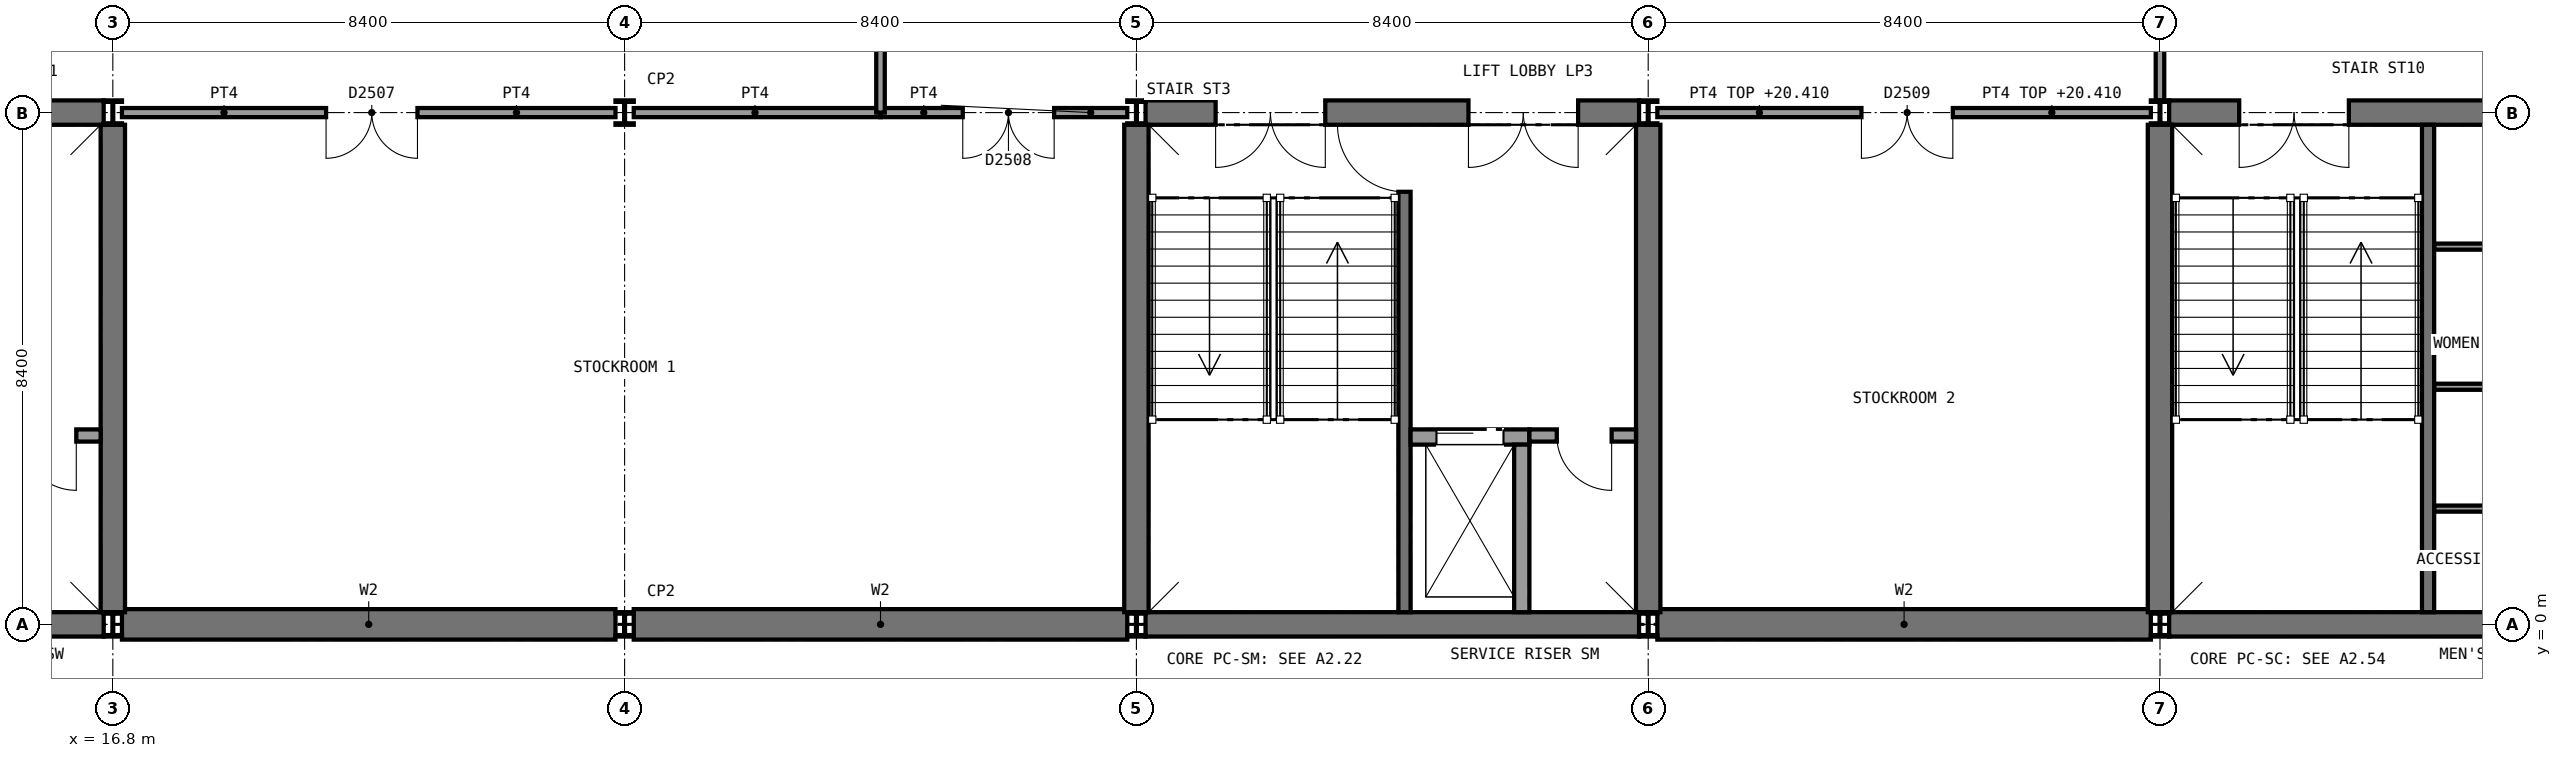
"""IFC4 building model, lengths in metres.
Left out: names, types, materials, properties, quantities, classifications, styles, units other than length and angle.
Written with IfcOpenShell. Run it as: python <this file> out.ifc"""

import sys

from ifc_helpers import new_model, si_unit, direction, frame, frame_2d, origin, origin_2d, place, context, subcontext, project, spatial, rectangle, i_section, extrude, element, fill, save


model = new_model("IFC4")
c1 = context("Model", 3, precision=1e-05, world=origin(), true_north=direction((0.0, 1.0)))
c2 = subcontext(c1, "Body", "Model", "MODEL_VIEW")
j1 = project(units=[si_unit("LENGTHUNIT", "METRE"), si_unit("PLANEANGLEUNIT", "RADIAN")], contexts=[c1])
p1 = place(None, origin())
s1 = spatial("IfcSite", under=j1, at=p1, CompositionType="ELEMENT")
p2 = place(p1, origin())
s2 = spatial("IfcBuilding", under=s1, at=p2, CompositionType="ELEMENT")
p3 = place(p2, frame((0.0, 0.0, 16.2)))
s3 = spatial("IfcBuildingStorey", under=s2, at=p3, CompositionType="ELEMENT", Elevation=16.2)
p4 = place(p3, frame((16.95, 0.0, 0.0), z_axis=(0.0, 0.0, 1.0), x_axis=(1.0, 0.0, 0.0)))
e1 = element("IfcWall", 1, at=p4, inside=s3, PredefinedType="SHEAR", context=c2, shape_type="SweptSolid", body=[
    extrude(rectangle(XDim=8.1, YDim=0.5, at=frame_2d((4.05, 0.0))), origin(), (0.0, 0.0, 1.0), 4.65),
])
p5 = place(p3, frame((25.35, 0.0, 0.0), z_axis=(0.0, 0.0, 1.0), x_axis=(1.0, 0.0, 0.0)))
e2 = element("IfcWall", 2, at=p5, inside=s3, PredefinedType="SHEAR", context=c2, shape_type="SweptSolid", body=[
    extrude(rectangle(XDim=8.1, YDim=0.5, at=frame_2d((4.05, 0.0))), origin(), (0.0, 0.0, 1.0), 4.65),
])
p6 = place(p3, frame((42.15, 0.0, 0.0), z_axis=(0.0, 0.0, 1.0), x_axis=(1.0, 0.0, 0.0)))
e3 = element("IfcWall", 3, at=p6, inside=s3, PredefinedType="SHEAR", context=c2, shape_type="SweptSolid", body=[
    extrude(rectangle(XDim=8.1, YDim=0.5, at=frame_2d((4.05, 0.0))), origin(), (0.0, 0.0, 1.0), 4.65),
])
p7 = place(p3, frame((8.55, 0.0, 0.0), z_axis=(0.0, 0.0, 1.0), x_axis=(1.0, 0.0, 0.0)))
e4 = element("IfcWall", 4, at=p7, inside=s3, PredefinedType="SHEAR", context=c2, shape_type="SweptSolid", body=[
    extrude(rectangle(XDim=8.1, YDim=0.4, at=frame_2d((4.05, 0.0))), origin(), (0.0, 0.0, 1.0), 4.65),
])
p8 = place(p3, frame((8.55, 8.4, 0.0), z_axis=(0.0, 0.0, 1.0), x_axis=(1.0, 0.0, 0.0)))
e5 = element("IfcWall", 5, at=p8, inside=s3, PredefinedType="SHEAR", context=c2, shape_type="SweptSolid", body=[
    extrude(rectangle(XDim=8.1, YDim=0.4, at=frame_2d((4.05, 0.0))), origin(), (0.0, 0.0, 1.0), 4.65),
])
p9 = place(p8, frame((1.15, 0.0, 0.0)))
e6 = element("IfcOpeningElement", 6, at=p9, cuts=e5, PredefinedType="OPENING", context=c2, shape_type="SweptSolid", body=[
    extrude(rectangle(XDim=1.8, YDim=2.1, at=frame_2d((0.9, 1.05))), frame((0.0, 0.21, 0.0), z_axis=(0.0, -1.0, 0.0), x_axis=(1.0, 0.0, 0.0)), (0.0, 0.0, 1.0), 0.42),
])
p10 = place(p8, frame((5.3, 0.0, 0.0)))
e7 = element("IfcOpeningElement", 7, at=p10, cuts=e5, PredefinedType="OPENING", context=c2, shape_type="SweptSolid", body=[
    extrude(rectangle(XDim=1.8, YDim=2.1, at=frame_2d((0.9, 1.05))), frame((0.0, 0.21, 0.0), z_axis=(0.0, -1.0, 0.0), x_axis=(1.0, 0.0, 0.0)), (0.0, 0.0, 1.0), 0.42),
])
p11 = place(p3, frame((16.8, 0.2, 0.0), z_axis=(0.0, 0.0, 1.0), x_axis=(0.0, 1.0, 0.0)))
e8 = element("IfcWall", 8, at=p11, inside=s3, PredefinedType="SHEAR", context=c2, shape_type="SweptSolid", body=[
    extrude(rectangle(XDim=8.0, YDim=0.4, at=frame_2d((4.0, 0.0))), origin(), (0.0, 0.0, 1.0), 4.65),
])
p12 = place(p3, frame((33.75, 0.0, 0.0), z_axis=(0.0, 0.0, 1.0), x_axis=(1.0, 0.0, 0.0)))
e9 = element("IfcWall", 9, at=p12, inside=s3, PredefinedType="SHEAR", context=c2, shape_type="SweptSolid", body=[
    extrude(rectangle(XDim=8.1, YDim=0.4, at=frame_2d((4.05, 0.0))), origin(), (0.0, 0.0, 1.0), 4.65),
])
p13 = place(p3, frame((33.75, 8.4, 0.0), z_axis=(0.0, 0.0, 1.0), x_axis=(1.0, 0.0, 0.0)))
e10 = element("IfcWall", 10, at=p13, inside=s3, PredefinedType="SHEAR", context=c2, shape_type="SweptSolid", body=[
    extrude(rectangle(XDim=8.1, YDim=0.4, at=frame_2d((4.05, 0.0))), origin(), (0.0, 0.0, 1.0), 4.65),
])
p14 = place(p13, frame((1.15, 0.0, 0.0)))
e11 = element("IfcOpeningElement", 11, at=p14, cuts=e10, PredefinedType="OPENING", context=c2, shape_type="SweptSolid", body=[
    extrude(rectangle(XDim=1.8, YDim=2.1, at=frame_2d((0.9, 1.05))), frame((0.0, 0.21, 0.0), z_axis=(0.0, -1.0, 0.0), x_axis=(1.0, 0.0, 0.0)), (0.0, 0.0, 1.0), 0.42),
])
p15 = place(p13, frame((5.3, 0.0, 0.0)))
e12 = element("IfcOpeningElement", 12, at=p15, cuts=e10, PredefinedType="OPENING", context=c2, shape_type="SweptSolid", body=[
    extrude(rectangle(XDim=1.8, YDim=2.1, at=frame_2d((0.9, 1.05))), frame((0.0, 0.21, 0.0), z_axis=(0.0, -1.0, 0.0), x_axis=(1.0, 0.0, 0.0)), (0.0, 0.0, 1.0), 0.42),
])
for number, where, z_axis, x_axis in (
    (13, (33.6, 0.2, 0.0), (0.0, 0.0, 1.0), (0.0, 1.0, 0.0)),
    (14, (42.0, 0.2, 0.0), (0.0, 0.0, 1.0), (0.0, 1.0, 0.0)),
):
    element("IfcWall", number, at=place(p3, frame(where, z_axis=z_axis, x_axis=x_axis)), inside=s3, PredefinedType="SHEAR", context=c2, shape_type="SweptSolid", body=[
        extrude(rectangle(XDim=8.0, YDim=0.4, at=frame_2d((4.0, 0.0))), origin(), (0.0, 0.0, 1.0), 4.65),
    ])
p16 = place(p3, frame((50.55, 0.0, 0.0), z_axis=(0.0, 0.0, 1.0), x_axis=(1.0, 0.0, 0.0)))
e15 = element("IfcWall", 15, at=p16, inside=s3, PredefinedType="SHEAR", context=c2, shape_type="SweptSolid", body=[
    extrude(rectangle(XDim=8.1, YDim=0.4, at=frame_2d((4.05, 0.0))), origin(), (0.0, 0.0, 1.0), 4.65),
])
p17 = place(p3, frame((50.55, 8.4, 0.0), z_axis=(0.0, 0.0, 1.0), x_axis=(1.0, 0.0, 0.0)))
e16 = element("IfcWall", 16, at=p17, inside=s3, PredefinedType="SHEAR", context=c2, shape_type="SweptSolid", body=[
    extrude(rectangle(XDim=8.1, YDim=0.4, at=frame_2d((4.05, 0.0))), origin(), (0.0, 0.0, 1.0), 4.65),
])
p18 = place(p17, frame((1.15, 0.0, 0.0)))
e17 = element("IfcOpeningElement", 17, at=p18, cuts=e16, PredefinedType="OPENING", context=c2, shape_type="SweptSolid", body=[
    extrude(rectangle(XDim=1.8, YDim=2.1, at=frame_2d((0.9, 1.05))), frame((0.0, 0.21, 0.0), z_axis=(0.0, -1.0, 0.0), x_axis=(1.0, 0.0, 0.0)), (0.0, 0.0, 1.0), 0.42),
])
p19 = place(p17, frame((5.6, 0.0, 0.0)))
e18 = element("IfcOpeningElement", 18, at=p19, cuts=e16, PredefinedType="OPENING", context=c2, shape_type="SweptSolid", body=[
    extrude(rectangle(XDim=1.2, YDim=2.1, at=frame_2d((0.6, 1.05))), frame((0.0, 0.21, 0.0), z_axis=(0.0, -1.0, 0.0), x_axis=(1.0, 0.0, 0.0)), (0.0, 0.0, 1.0), 0.42),
])
p20 = place(p3, frame((50.4, 0.2, 0.0), z_axis=(0.0, 0.0, 1.0), x_axis=(0.0, 1.0, 0.0)))
e19 = element("IfcWall", 19, at=p20, inside=s3, PredefinedType="SHEAR", context=c2, shape_type="SweptSolid", body=[
    extrude(rectangle(XDim=8.0, YDim=0.4, at=frame_2d((4.0, 0.0))), origin(), (0.0, 0.0, 1.0), 4.65),
])
for number, where, z_axis, x_axis in (
    (20, (16.8, 0.0, 0.0), (0.0, 0.0, 1.0), (1.0, 0.0, 0.0)),
    (21, (16.8, 8.4, 0.0), (0.0, 0.0, 1.0), (1.0, 0.0, 0.0)),
    (22, (25.2, 0.0, 0.0), (0.0, 0.0, 1.0), (1.0, 0.0, 0.0)),
    (23, (25.2, 8.4, 0.0), (0.0, 0.0, 1.0), (1.0, 0.0, 0.0)),
    (24, (33.6, 0.0, 0.0), (0.0, 0.0, 1.0), (1.0, 0.0, 0.0)),
    (25, (33.6, 8.4, 0.0), (0.0, 0.0, 1.0), (1.0, 0.0, 0.0)),
    (26, (42.0, 0.0, 0.0), (0.0, 0.0, 1.0), (1.0, 0.0, 0.0)),
    (27, (42.0, 8.4, 0.0), (0.0, 0.0, 1.0), (1.0, 0.0, 0.0)),
    (28, (50.4, 0.0, 0.0), (0.0, 0.0, 1.0), (1.0, 0.0, 0.0)),
    (29, (50.4, 8.4, 0.0), (0.0, 0.0, 1.0), (1.0, 0.0, 0.0)),
):
    element("IfcColumn", number, at=place(p3, frame(where, z_axis=z_axis, x_axis=x_axis)), inside=s3, PredefinedType="COLUMN", context=c2, shape_type="SweptSolid", body=[
        extrude(i_section(OverallWidth=0.3, OverallDepth=0.4, WebThickness=0.013, FlangeThickness=0.024, FilletRadius=0.027, at=origin_2d()), origin(), (0.0, 0.0, 1.0), 4.8),
    ])
p21 = place(p3, frame((54.9, 6.2, 0.0), z_axis=(0.0, 0.0, 1.0), x_axis=(1.0, 0.0, 0.0)))
e30 = element("IfcWall", 30, at=p21, inside=s3, PredefinedType="PARTITIONING", context=c2, shape_type="SweptSolid", body=[
    extrude(rectangle(XDim=2.4, YDim=0.1, at=frame_2d((1.2, 0.0))), origin(), (0.0, 0.0, 1.0), 4.58),
])
p22 = place(p21, frame((0.85, 0.0, 0.0)))
e31 = element("IfcOpeningElement", 31, at=p22, cuts=e30, PredefinedType="OPENING", context=c2, shape_type="SweptSolid", body=[
    extrude(rectangle(XDim=0.9, YDim=2.1, at=frame_2d((0.45, 1.05))), frame((0.0, 0.06, 0.0), z_axis=(0.0, -1.0, 0.0), x_axis=(1.0, 0.0, 0.0)), (0.0, 0.0, 1.0), 0.12),
])
for number, where, z_axis, x_axis in (
    (32, (54.9, 3.9, 0.0), (0.0, 0.0, 1.0), (1.0, 0.0, 0.0)),
    (33, (54.9, 1.9, 0.0), (0.0, 0.0, 1.0), (1.0, 0.0, 0.0)),
):
    element("IfcWall", number, at=place(p3, frame(where, z_axis=z_axis, x_axis=x_axis)), inside=s3, PredefinedType="PARTITIONING", context=c2, shape_type="SweptSolid", body=[
        extrude(rectangle(XDim=2.4, YDim=0.1, at=frame_2d((1.2, 0.0))), origin(), (0.0, 0.0, 1.0), 4.58),
    ])
p23 = place(p3, frame((16.95, 8.4, 0.0), z_axis=(0.0, 0.0, 1.0), x_axis=(1.0, 0.0, 0.0)))
e34 = element("IfcWall", 34, at=p23, inside=s3, PredefinedType="SOLIDWALL", context=c2, shape_type="SweptSolid", body=[
    extrude(rectangle(XDim=8.1, YDim=0.15, at=frame_2d((4.05, 0.0))), origin(), (0.0, 0.0, 1.0), 4.32),
])
p24 = place(p23, frame((3.35, 0.0, 0.0)))
e35 = element("IfcOpeningElement", 35, at=p24, cuts=e34, PredefinedType="OPENING", context=c2, shape_type="SweptSolid", body=[
    extrude(rectangle(XDim=1.5, YDim=2.1, at=frame_2d((0.75, 1.05))), frame((0.0, 0.085, 0.0), z_axis=(0.0, -1.0, 0.0), x_axis=(1.0, 0.0, 0.0)), (0.0, 0.0, 1.0), 0.17),
])
p25 = place(p3, frame((25.35, 8.4, 0.0), z_axis=(0.0, 0.0, 1.0), x_axis=(1.0, 0.0, 0.0)))
e36 = element("IfcWall", 36, at=p25, inside=s3, PredefinedType="SOLIDWALL", context=c2, shape_type="SweptSolid", body=[
    extrude(rectangle(XDim=4.05, YDim=0.15, at=frame_2d((2.025, 0.0))), origin(), (0.0, 0.0, 1.0), 4.32),
])
p26 = place(p3, frame((29.4, 8.4, 0.0), z_axis=(0.0, 0.0, 1.0), x_axis=(1.0, 0.0, 0.0)))
e37 = element("IfcWall", 37, at=p26, inside=s3, PredefinedType="SOLIDWALL", context=c2, shape_type="SweptSolid", body=[
    extrude(rectangle(XDim=4.05, YDim=0.15, at=frame_2d((2.025, 0.0))), origin(), (0.0, 0.0, 1.0), 4.32),
])
p27 = place(p26, frame((1.35, 0.0, 0.0)))
e38 = element("IfcOpeningElement", 38, at=p27, cuts=e37, PredefinedType="OPENING", context=c2, shape_type="SweptSolid", body=[
    extrude(rectangle(XDim=1.5, YDim=2.1, at=frame_2d((0.75, 1.05))), frame((0.0, 0.085, 0.0), z_axis=(0.0, -1.0, 0.0), x_axis=(1.0, 0.0, 0.0)), (0.0, 0.0, 1.0), 0.17),
])
p28 = place(p3, frame((42.15, 8.4, 0.0), z_axis=(0.0, 0.0, 1.0), x_axis=(1.0, 0.0, 0.0)))
e39 = element("IfcWall", 39, at=p28, inside=s3, PredefinedType="SOLIDWALL", context=c2, shape_type="SweptSolid", body=[
    extrude(rectangle(XDim=8.1, YDim=0.15, at=frame_2d((4.05, 0.0))), origin(), (0.0, 0.0, 1.0), 4.21),
])
p29 = place(p28, frame((3.35, 0.0, 0.0)))
e40 = element("IfcOpeningElement", 40, at=p29, cuts=e39, PredefinedType="OPENING", context=c2, shape_type="SweptSolid", body=[
    extrude(rectangle(XDim=1.5, YDim=2.1, at=frame_2d((0.75, 1.05))), frame((0.0, 0.085, 0.0), z_axis=(0.0, -1.0, 0.0), x_axis=(1.0, 0.0, 0.0)), (0.0, 0.0, 1.0), 0.17),
])
p30 = place(p3, frame((29.4, 8.4, 0.0), z_axis=(0.0, 0.0, 1.0), x_axis=(0.0, 1.0, 0.0)))
e41 = element("IfcWall", 41, at=p30, inside=s3, PredefinedType="PARTITIONING", context=c2, shape_type="SweptSolid", body=[
    extrude(rectangle(XDim=7.6, YDim=0.14, at=frame_2d((3.8, 0.0))), origin(), (0.0, 0.0, 1.0), 4.65),
])
p31 = place(p3, frame((50.4, 8.6, 0.0), z_axis=(0.0, 0.0, 1.0), x_axis=(0.0, 1.0, 0.0)))
e42 = element("IfcWall", 42, at=p31, inside=s3, PredefinedType="PARTITIONING", context=c2, shape_type="SweptSolid", body=[
    extrude(rectangle(XDim=3.1, YDim=0.14, at=frame_2d((1.55, 0.0))), origin(), (0.0, 0.0, 1.0), 4.21),
])
p32 = place(p3, frame((14.85, 3.1, 0.0), z_axis=(0.0, 0.0, 1.0), x_axis=(1.0, 0.0, 0.0)))
e43 = element("IfcWall", 43, at=p32, inside=s3, PredefinedType="PARTITIONING", context=c2, shape_type="SweptSolid", body=[
    extrude(rectangle(XDim=1.75, YDim=0.2, at=frame_2d((0.875, 0.0))), origin(), (0.0, 0.0, 1.0), 4.65),
])
p33 = place(p32, frame((0.45, 0.0, 0.0)))
e44 = element("IfcOpeningElement", 44, at=p33, cuts=e43, PredefinedType="OPENING", context=c2, shape_type="SweptSolid", body=[
    extrude(rectangle(XDim=0.9, YDim=2.1, at=frame_2d((0.45, 1.05))), frame((0.0, 0.11, 0.0), z_axis=(0.0, -1.0, 0.0), x_axis=(1.0, 0.0, 0.0)), (0.0, 0.0, 1.0), 0.22),
])
p34 = place(p3, frame((38.0, 0.2, 0.0), z_axis=(0.0, 0.0, 1.0), x_axis=(0.0, 1.0, 0.0)))
e45 = element("IfcWall", 45, at=p34, inside=s3, PredefinedType="SHEAR", context=c2, shape_type="SweptSolid", body=[
    extrude(rectangle(XDim=8.0, YDim=0.2, at=frame_2d((4.0, 0.0))), origin(), (0.0, 0.0, 1.0), 4.65),
])
p35 = place(p34, frame((6.9, 0.0, 0.0)))
e46 = element("IfcOpeningElement", 46, at=p35, cuts=e45, PredefinedType="OPENING", context=c2, shape_type="SweptSolid", body=[
    extrude(rectangle(XDim=1.11, YDim=2.1, at=frame_2d((0.555, 1.05))), frame((0.0, 0.11, 0.0), z_axis=(0.0, -1.0, 0.0), x_axis=(1.0, 0.0, 0.0)), (0.0, 0.0, 1.0), 0.22),
])
p36 = place(p3, frame((38.1, 3.075, 0.0), z_axis=(0.0, 0.0, 1.0), x_axis=(1.0, 0.0, 0.0)))
e47 = element("IfcWall", 47, at=p36, inside=s3, PredefinedType="SOLIDWALL", context=c2, shape_type="SweptSolid", body=[
    extrude(rectangle(XDim=1.95, YDim=0.25, at=frame_2d((0.975, 0.0))), origin(), (0.0, 0.0, 1.0), 4.8),
])
p37 = place(p36, frame((0.425, 0.0, 0.0)))
e48 = element("IfcOpeningElement", 48, at=p37, cuts=e47, PredefinedType="OPENING", context=c2, shape_type="SweptSolid", body=[
    extrude(rectangle(XDim=1.1, YDim=2.1, at=frame_2d((0.55, 1.05))), frame((0.0, 0.135, 0.0), z_axis=(0.0, -1.0, 0.0), x_axis=(1.0, 0.0, 0.0)), (0.0, 0.0, 1.0), 0.27),
])
p38 = place(p3, frame((39.925, 0.2, 0.0), z_axis=(0.0, 0.0, 1.0), x_axis=(0.0, 1.0, 0.0)))
e49 = element("IfcWall", 49, at=p38, inside=s3, PredefinedType="SOLIDWALL", context=c2, shape_type="SweptSolid", body=[
    extrude(rectangle(XDim=2.75, YDim=0.25, at=frame_2d((1.375, 0.0))), origin(), (0.0, 0.0, 1.0), 4.8),
])
p39 = place(p3, frame((40.05, 3.1, 0.0), z_axis=(0.0, 0.0, 1.0), x_axis=(1.0, 0.0, 0.0)))
e50 = element("IfcWall", 50, at=p39, inside=s3, PredefinedType="PARTITIONING", context=c2, shape_type="SweptSolid", body=[
    extrude(rectangle(XDim=1.75, YDim=0.2, at=frame_2d((0.875, 0.0))), origin(), (0.0, 0.0, 1.0), 4.65),
])
p40 = place(p39, frame((0.45, 0.0, 0.0)))
e51 = element("IfcOpeningElement", 51, at=p40, cuts=e50, PredefinedType="OPENING", context=c2, shape_type="SweptSolid", body=[
    extrude(rectangle(XDim=0.9, YDim=2.1, at=frame_2d((0.45, 1.05))), frame((0.0, 0.11, 0.0), z_axis=(0.0, -1.0, 0.0), x_axis=(1.0, 0.0, 0.0)), (0.0, 0.0, 1.0), 0.22),
])
p41 = place(p3, frame((54.8, 0.2, 0.0), z_axis=(0.0, 0.0, 1.0), x_axis=(0.0, 1.0, 0.0)))
e52 = element("IfcWall", 52, at=p41, inside=s3, PredefinedType="SHEAR", context=c2, shape_type="SweptSolid", body=[
    extrude(rectangle(XDim=8.0, YDim=0.2, at=frame_2d((4.0, 0.0))), origin(), (0.0, 0.0, 1.0), 4.65),
])
p42 = place(p24, frame((1.5, 0.0, 0.0), z_axis=(0.0, 0.0, 1.0), x_axis=(-1.0, 0.0, 0.0)))
e53 = element("IfcDoor", 53, at=p42, inside=s3, OperationType="DOUBLE_DOOR_SINGLE_SWING", PredefinedType="DOOR", context=c2, shape_type="SweptSolid", body=[
    extrude(rectangle(XDim=1.5, YDim=2.1, at=frame_2d((0.75, 1.05))), frame((0.0, 0.025, 0.0), z_axis=(0.0, -1.0, 0.0), x_axis=(1.0, 0.0, 0.0)), (0.0, 0.0, 1.0), 0.05),
])
fill(e35, e53)
p43 = place(p27, frame((1.5, 0.0, 0.0), z_axis=(0.0, 0.0, 1.0), x_axis=(-1.0, 0.0, 0.0)))
e54 = element("IfcDoor", 54, at=p43, inside=s3, OperationType="DOUBLE_DOOR_SINGLE_SWING", PredefinedType="DOOR", context=c2, shape_type="SweptSolid", body=[
    extrude(rectangle(XDim=1.5, YDim=2.1, at=frame_2d((0.75, 1.05))), frame((0.0, 0.025, 0.0), z_axis=(0.0, -1.0, 0.0), x_axis=(1.0, 0.0, 0.0)), (0.0, 0.0, 1.0), 0.05),
])
fill(e38, e54)
p44 = place(p29, frame((1.5, 0.0, 0.0), z_axis=(0.0, 0.0, 1.0), x_axis=(-1.0, 0.0, 0.0)))
e55 = element("IfcDoor", 55, at=p44, inside=s3, OperationType="DOUBLE_DOOR_SINGLE_SWING", PredefinedType="DOOR", context=c2, shape_type="SweptSolid", body=[
    extrude(rectangle(XDim=1.5, YDim=2.1, at=frame_2d((0.75, 1.05))), frame((0.0, 0.025, 0.0), z_axis=(0.0, -1.0, 0.0), x_axis=(1.0, 0.0, 0.0)), (0.0, 0.0, 1.0), 0.05),
])
fill(e40, e55)
p45 = place(p33, frame((0.9, 0.0, 0.0), z_axis=(0.0, 0.0, 1.0), x_axis=(-1.0, 0.0, 0.0)))
e56 = element("IfcDoor", 56, at=p45, inside=s3, OperationType="SINGLE_SWING_LEFT", PredefinedType="DOOR", context=c2, shape_type="SweptSolid", body=[
    extrude(rectangle(XDim=0.9, YDim=2.1, at=frame_2d((0.45, 1.05))), frame((0.0, 0.025, 0.0), z_axis=(0.0, -1.0, 0.0), x_axis=(1.0, 0.0, 0.0)), (0.0, 0.0, 1.0), 0.05),
])
fill(e44, e56)
p46 = place(p35, origin())
e57 = element("IfcDoor", 57, at=p46, inside=s3, OperationType="SINGLE_SWING_RIGHT", PredefinedType="DOOR", context=c2, shape_type="SweptSolid", body=[
    extrude(rectangle(XDim=1.1, YDim=2.1, at=frame_2d((0.55, 1.05))), frame((0.0, 0.025, 0.0), z_axis=(0.0, -1.0, 0.0), x_axis=(1.0, 0.0, 0.0)), (0.0, 0.0, 1.0), 0.05),
])
fill(e46, e57)
p47 = place(p37, origin())
e58 = element("IfcDoor", 58, at=p47, inside=s3, OperationType="SLIDING_TO_LEFT", PredefinedType="DOOR", context=c2, shape_type="SweptSolid", body=[
    extrude(rectangle(XDim=1.1, YDim=2.1, at=frame_2d((0.55, 1.05))), frame((0.0, 0.025, 0.0), z_axis=(0.0, -1.0, 0.0), x_axis=(1.0, 0.0, 0.0)), (0.0, 0.0, 1.0), 0.05),
])
fill(e48, e58)
p48 = place(p40, frame((0.9, 0.0, 0.0), z_axis=(0.0, 0.0, 1.0), x_axis=(-1.0, 0.0, 0.0)))
e59 = element("IfcDoor", 59, at=p48, inside=s3, OperationType="SINGLE_SWING_LEFT", PredefinedType="DOOR", context=c2, shape_type="SweptSolid", body=[
    extrude(rectangle(XDim=0.9, YDim=2.1, at=frame_2d((0.45, 1.05))), frame((0.0, 0.025, 0.0), z_axis=(0.0, -1.0, 0.0), x_axis=(1.0, 0.0, 0.0)), (0.0, 0.0, 1.0), 0.05),
])
fill(e51, e59)
p49 = place(p14, frame((1.8, 0.0, 0.0), z_axis=(0.0, 0.0, 1.0), x_axis=(-1.0, 0.0, 0.0)))
e60 = element("IfcDoor", 60, at=p49, inside=s3, OperationType="DOUBLE_DOOR_SINGLE_SWING", PredefinedType="DOOR", context=c2, shape_type="SweptSolid", body=[
    extrude(rectangle(XDim=1.8, YDim=2.1, at=frame_2d((0.9, 1.05))), frame((0.0, 0.025, 0.0), z_axis=(0.0, -1.0, 0.0), x_axis=(1.0, 0.0, 0.0)), (0.0, 0.0, 1.0), 0.05),
])
fill(e11, e60)
p50 = place(p15, frame((1.8, 0.0, 0.0), z_axis=(0.0, 0.0, 1.0), x_axis=(-1.0, 0.0, 0.0)))
e61 = element("IfcDoor", 61, at=p50, inside=s3, OperationType="DOUBLE_DOOR_SINGLE_SWING", PredefinedType="DOOR", context=c2, shape_type="SweptSolid", body=[
    extrude(rectangle(XDim=1.8, YDim=2.1, at=frame_2d((0.9, 1.05))), frame((0.0, 0.025, 0.0), z_axis=(0.0, -1.0, 0.0), x_axis=(1.0, 0.0, 0.0)), (0.0, 0.0, 1.0), 0.05),
])
fill(e12, e61)
p51 = place(p18, frame((1.8, 0.0, 0.0), z_axis=(0.0, 0.0, 1.0), x_axis=(-1.0, 0.0, 0.0)))
e62 = element("IfcDoor", 62, at=p51, inside=s3, OperationType="DOUBLE_DOOR_SINGLE_SWING", PredefinedType="DOOR", context=c2, shape_type="SweptSolid", body=[
    extrude(rectangle(XDim=1.8, YDim=2.1, at=frame_2d((0.9, 1.05))), frame((0.0, 0.025, 0.0), z_axis=(0.0, -1.0, 0.0), x_axis=(1.0, 0.0, 0.0)), (0.0, 0.0, 1.0), 0.05),
])
fill(e17, e62)
save(model, sys.argv[1])
